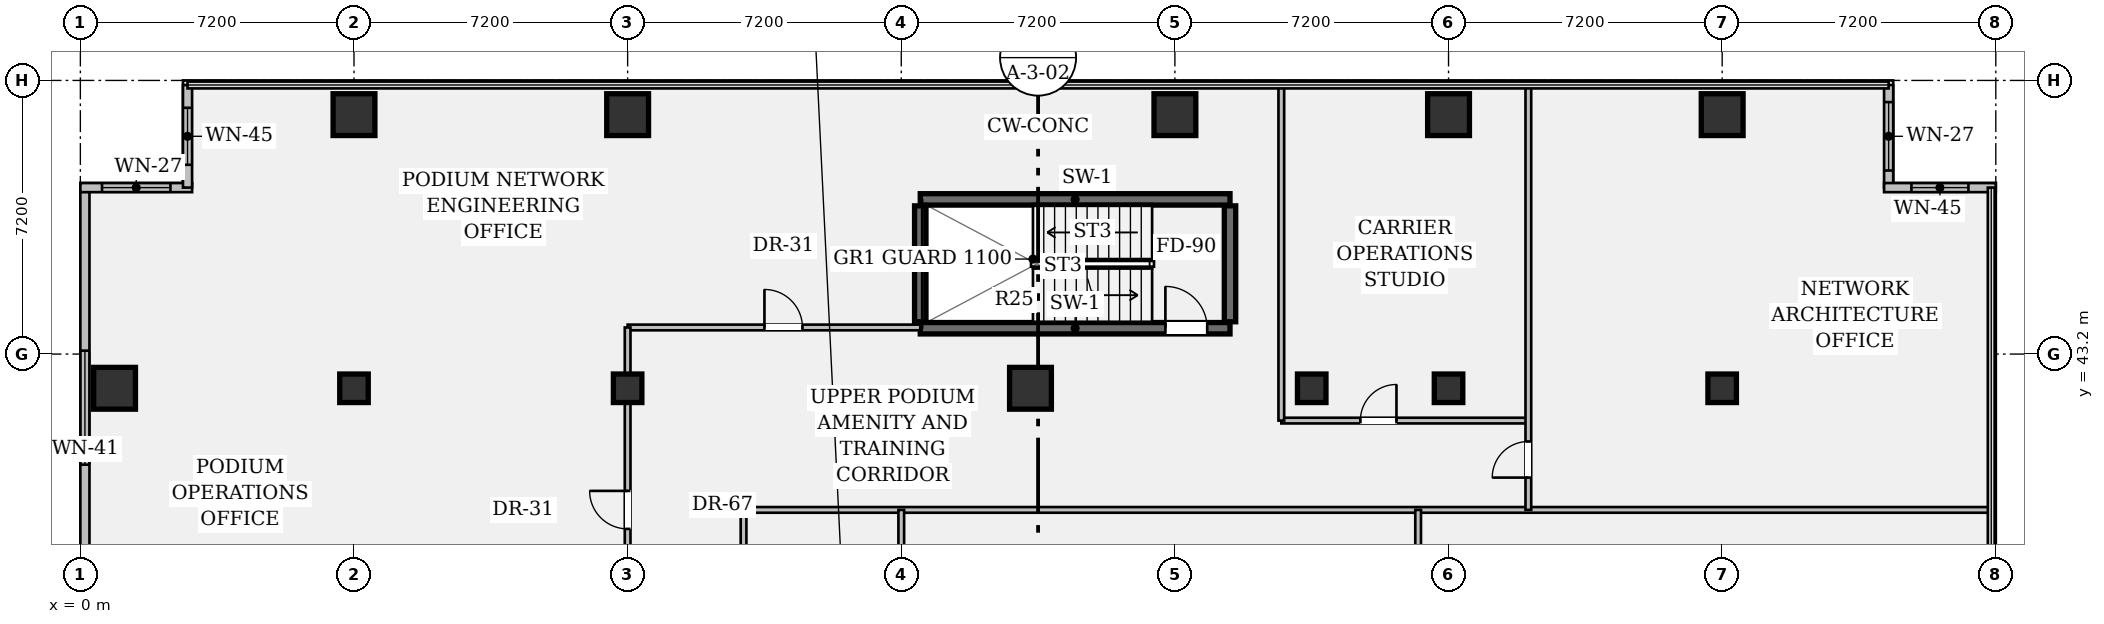
"""IFC4 building model, lengths in metres.
Left out: names, types, materials, properties, quantities, classifications, styles, units other than length and angle.
Written with IfcOpenShell. Run it as: python <this file> out.ifc"""

import sys

from ifc_helpers import new_model, si_unit, direction, frame, frame_2d, origin, origin_2d, place, context, subcontext, project, spatial, rectangle, hollow_rectangle, extrude, element, fill, save


model = new_model("IFC4")
c1 = context("Model", 3, precision=1e-05, world=origin(), true_north=direction((0.0, 1.0)))
c2 = subcontext(c1, "Body", "Model", "MODEL_VIEW")
j1 = project(units=[si_unit("LENGTHUNIT", "METRE"), si_unit("PLANEANGLEUNIT", "RADIAN")], contexts=[c1])
p1 = place(None, origin())
s1 = spatial("IfcSite", under=j1, at=p1, CompositionType="ELEMENT")
p2 = place(p1, origin())
s2 = spatial("IfcBuilding", under=s1, at=p2, CompositionType="ELEMENT")
p3 = place(p2, frame((0.0, 0.0, 17.85)))
s3 = spatial("IfcBuildingStorey", under=s2, at=p3, CompositionType="ELEMENT", Elevation=17.85)
p4 = place(p3, frame((22.1, 43.88, 0.0), z_axis=(0.0, 0.0, 1.0), x_axis=(1.0, 0.0, 0.0)))
e1 = element("IfcWall", 1, at=p4, inside=s3, PredefinedType="SHEAR", context=c2, shape_type="SweptSolid", body=[
    extrude(rectangle(XDim=8.15, YDim=0.3, at=frame_2d((4.075, 0.0))), origin(), (0.0, 0.0, 1.0), 3.91),
])
p5 = place(p4, frame((6.45, 0.0, 0.0)))
e2 = element("IfcOpeningElement", 2, at=p5, cuts=e1, PredefinedType="OPENING", context=c2, shape_type="SweptSolid", body=[
    extrude(rectangle(XDim=1.1, YDim=2.15, at=frame_2d((0.55, 1.075))), frame((0.0, 0.162, 0.0), z_axis=(0.0, -1.0, 0.0), x_axis=(1.0, 0.0, 0.0)), (0.0, 0.0, 1.0), 0.324),
])
p6 = place(p3, frame((22.1, 47.27, 0.0), z_axis=(0.0, 0.0, 1.0), x_axis=(1.0, 0.0, 0.0)))
e3 = element("IfcWall", 3, at=p6, inside=s3, PredefinedType="SHEAR", context=c2, shape_type="SweptSolid", body=[
    extrude(rectangle(XDim=8.15, YDim=0.3, at=frame_2d((4.075, 0.0))), origin(), (0.0, 0.0, 1.0), 3.91),
])
for number, where, z_axis, x_axis in (
    (4, (22.1, 44.05, 0.0), (0.0, 0.0, 1.0), (0.0, 1.0, 0.0)),
    (5, (30.25, 44.05, 0.0), (0.0, 0.0, 1.0), (0.0, 1.0, 0.0)),
):
    element("IfcWall", number, at=place(p3, frame(where, z_axis=z_axis, x_axis=x_axis)), inside=s3, PredefinedType="SHEAR", context=c2, shape_type="SweptSolid", body=[
        extrude(rectangle(XDim=3.05, YDim=0.3, at=frame_2d((1.525, 0.0))), origin(), (0.0, 0.0, 1.0), 3.91),
    ])
p7 = place(p3, frame((0.9, 42.3, 0.0), z_axis=(0.0, 0.0, 1.0), x_axis=(1.0, 0.0, 0.0)))
e6 = element("IfcColumn", 6, at=p7, inside=s3, PredefinedType="COLUMN", context=c2, shape_type="SweptSolid", body=[
    extrude(hollow_rectangle(XDim=1.1, YDim=1.1, WallThickness=0.07, at=origin_2d()), origin(), (0.0, 0.0, 1.0), 3.91),
])
p8 = place(p3, frame((7.2, 42.3, 0.0), z_axis=(0.0, 0.0, 1.0), x_axis=(1.0, 0.0, 0.0)))
e7 = element("IfcColumn", 7, at=p8, inside=s3, PredefinedType="COLUMN", context=c2, shape_type="SweptSolid", body=[
    extrude(rectangle(XDim=0.75, YDim=0.75, at=origin_2d()), origin(), (0.0, 0.0, 1.0), 3.91),
])
p9 = place(p3, frame((7.2, 49.5, 0.0), z_axis=(0.0, 0.0, 1.0), x_axis=(1.0, 0.0, 0.0)))
e8 = element("IfcColumn", 8, at=p9, inside=s3, PredefinedType="COLUMN", context=c2, shape_type="SweptSolid", body=[
    extrude(hollow_rectangle(XDim=1.1, YDim=1.1, WallThickness=0.07, at=origin_2d()), origin(), (0.0, 0.0, 1.0), 3.91),
])
p10 = place(p3, frame((14.4, 42.3, 0.0), z_axis=(0.0, 0.0, 1.0), x_axis=(1.0, 0.0, 0.0)))
e9 = element("IfcColumn", 9, at=p10, inside=s3, PredefinedType="COLUMN", context=c2, shape_type="SweptSolid", body=[
    extrude(rectangle(XDim=0.75, YDim=0.75, at=origin_2d()), origin(), (0.0, 0.0, 1.0), 3.91),
])
for number, where, z_axis, x_axis in (
    (10, (14.4, 49.5, 0.0), (0.0, 0.0, 1.0), (1.0, 0.0, 0.0)),
    (11, (25.0, 42.3, 0.0), (0.0, 0.0, 1.0), (1.0, 0.0, 0.0)),
    (12, (28.8, 49.5, 0.0), (0.0, 0.0, 1.0), (1.0, 0.0, 0.0)),
):
    element("IfcColumn", number, at=place(p3, frame(where, z_axis=z_axis, x_axis=x_axis)), inside=s3, PredefinedType="COLUMN", context=c2, shape_type="SweptSolid", body=[
        extrude(hollow_rectangle(XDim=1.1, YDim=1.1, WallThickness=0.07, at=origin_2d()), origin(), (0.0, 0.0, 1.0), 3.91),
    ])
for number, where, z_axis, x_axis in (
    (13, (32.4, 42.3, 0.0), (0.0, 0.0, 1.0), (1.0, 0.0, 0.0)),
    (14, (36.0, 42.3, 0.0), (0.0, 0.0, 1.0), (1.0, 0.0, 0.0)),
):
    element("IfcColumn", number, at=place(p3, frame(where, z_axis=z_axis, x_axis=x_axis)), inside=s3, PredefinedType="COLUMN", context=c2, shape_type="SweptSolid", body=[
        extrude(rectangle(XDim=0.75, YDim=0.75, at=origin_2d()), origin(), (0.0, 0.0, 1.0), 3.91),
    ])
p11 = place(p3, frame((36.0, 49.5, 0.0), z_axis=(0.0, 0.0, 1.0), x_axis=(1.0, 0.0, 0.0)))
e15 = element("IfcColumn", 15, at=p11, inside=s3, PredefinedType="COLUMN", context=c2, shape_type="SweptSolid", body=[
    extrude(hollow_rectangle(XDim=1.1, YDim=1.1, WallThickness=0.07, at=origin_2d()), origin(), (0.0, 0.0, 1.0), 3.91),
])
p12 = place(p3, frame((43.2, 42.3, 0.0), z_axis=(0.0, 0.0, 1.0), x_axis=(1.0, 0.0, 0.0)))
e16 = element("IfcColumn", 16, at=p12, inside=s3, PredefinedType="COLUMN", context=c2, shape_type="SweptSolid", body=[
    extrude(rectangle(XDim=0.75, YDim=0.75, at=origin_2d()), origin(), (0.0, 0.0, 1.0), 3.91),
])
p13 = place(p3, frame((43.2, 49.5, 0.0), z_axis=(0.0, 0.0, 1.0), x_axis=(1.0, 0.0, 0.0)))
e17 = element("IfcColumn", 17, at=p13, inside=s3, PredefinedType="COLUMN", context=c2, shape_type="SweptSolid", body=[
    extrude(hollow_rectangle(XDim=1.1, YDim=1.1, WallThickness=0.07, at=origin_2d()), origin(), (0.0, 0.0, 1.0), 3.91),
])
p14 = place(p3, frame((0.12, 36.0, 0.0), z_axis=(0.0, 0.0, 1.0), x_axis=(0.0, 1.0, 0.0)))
e18 = element("IfcWall", 18, at=p14, inside=s3, PredefinedType="STANDARD", context=c2, shape_type="SweptSolid", body=[
    extrude(rectangle(XDim=11.58, YDim=0.24, at=frame_2d((5.79, 0.0))), origin(), (0.0, 0.0, 1.0), 3.91),
])
p15 = place(p14, frame((4.29, 0.0, 0.95)))
e19 = element("IfcOpeningElement", 19, at=p15, cuts=e18, PredefinedType="OPENING", context=c2, shape_type="SweptSolid", body=[
    extrude(rectangle(XDim=3.0, YDim=1.5, at=frame_2d((1.5, 0.75))), frame((0.0, 0.132, 0.0), z_axis=(0.0, -1.0, 0.0), x_axis=(1.0, 0.0, 0.0)), (0.0, 0.0, 1.0), 0.264),
])
p16 = place(p3, frame((0.0, 47.58, 0.0), z_axis=(0.0, 0.0, 1.0), x_axis=(1.0, 0.0, 0.0)))
e20 = element("IfcWall", 20, at=p16, inside=s3, PredefinedType="STANDARD", context=c2, shape_type="SweptSolid", body=[
    extrude(rectangle(XDim=2.94, YDim=0.24, at=frame_2d((1.47, 0.0))), origin(), (0.0, 0.0, 1.0), 3.91),
])
p17 = place(p16, frame((0.57, 0.0, 0.95)))
e21 = element("IfcOpeningElement", 21, at=p17, cuts=e20, PredefinedType="OPENING", context=c2, shape_type="SweptSolid", body=[
    extrude(rectangle(XDim=1.8, YDim=1.35, at=frame_2d((0.9, 0.675))), frame((0.0, 0.132, 0.0), z_axis=(0.0, -1.0, 0.0), x_axis=(1.0, 0.0, 0.0)), (0.0, 0.0, 1.0), 0.264),
])
p18 = place(p3, frame((2.82, 47.58, 0.0), z_axis=(0.0, 0.0, 1.0), x_axis=(0.0, 1.0, 0.0)))
e22 = element("IfcWall", 22, at=p18, inside=s3, PredefinedType="STANDARD", context=c2, shape_type="SweptSolid", body=[
    extrude(rectangle(XDim=2.7, YDim=0.24, at=frame_2d((1.35, 0.0))), origin(), (0.0, 0.0, 1.0), 3.91),
])
p19 = place(p18, frame((0.6, 0.0, 0.95)))
e23 = element("IfcOpeningElement", 23, at=p19, cuts=e22, PredefinedType="OPENING", context=c2, shape_type="SweptSolid", body=[
    extrude(rectangle(XDim=1.5, YDim=1.8, at=frame_2d((0.75, 0.9))), frame((0.0, 0.132, 0.0), z_axis=(0.0, -1.0, 0.0), x_axis=(1.0, 0.0, 0.0)), (0.0, 0.0, 1.0), 0.264),
])
p20 = place(p3, frame((47.58, 50.28, 0.0), z_axis=(0.0, 0.0, 1.0), x_axis=(0.0, -1.0, 0.0)))
e24 = element("IfcWall", 24, at=p20, inside=s3, PredefinedType="STANDARD", context=c2, shape_type="SweptSolid", body=[
    extrude(rectangle(XDim=2.7, YDim=0.24, at=frame_2d((1.35, 0.0))), origin(), (0.0, 0.0, 1.0), 3.91),
])
p21 = place(p20, frame((0.45, 0.0, 0.95)))
e25 = element("IfcOpeningElement", 25, at=p21, cuts=e24, PredefinedType="OPENING", context=c2, shape_type="SweptSolid", body=[
    extrude(rectangle(XDim=1.8, YDim=1.35, at=frame_2d((0.9, 0.675))), frame((0.0, 0.132, 0.0), z_axis=(0.0, -1.0, 0.0), x_axis=(1.0, 0.0, 0.0)), (0.0, 0.0, 1.0), 0.264),
])
p22 = place(p3, frame((47.46, 47.58, 0.0), z_axis=(0.0, 0.0, 1.0), x_axis=(1.0, 0.0, 0.0)))
e26 = element("IfcWall", 26, at=p22, inside=s3, PredefinedType="STANDARD", context=c2, shape_type="SweptSolid", body=[
    extrude(rectangle(XDim=2.94, YDim=0.24, at=frame_2d((1.47, 0.0))), origin(), (0.0, 0.0, 1.0), 3.91),
])
p23 = place(p22, frame((0.72, 0.0, 0.95)))
e27 = element("IfcOpeningElement", 27, at=p23, cuts=e26, PredefinedType="OPENING", context=c2, shape_type="SweptSolid", body=[
    extrude(rectangle(XDim=1.5, YDim=1.8, at=frame_2d((0.75, 0.9))), frame((0.0, 0.132, 0.0), z_axis=(0.0, -1.0, 0.0), x_axis=(1.0, 0.0, 0.0)), (0.0, 0.0, 1.0), 0.264),
])
p24 = place(p3, frame((17.45, 26.8, 0.0), z_axis=(0.0, 0.0, 1.0), x_axis=(0.0, 1.0, 0.0)))
e28 = element("IfcWall", 28, at=p24, inside=s3, PredefinedType="PARTITIONING", context=c2, shape_type="SweptSolid", body=[
    extrude(rectangle(XDim=12.3, YDim=0.15, at=frame_2d((6.15, 0.0))), origin(), (0.0, 0.0, 1.0), 2.968),
])
p25 = place(p24, frame((9.76, 0.0, 0.0)))
e29 = element("IfcOpeningElement", 29, at=p25, cuts=e28, PredefinedType="OPENING", context=c2, shape_type="SweptSolid", body=[
    extrude(rectangle(XDim=0.95, YDim=2.15, at=frame_2d((0.475, 1.075))), frame((0.0, 0.087, 0.0), z_axis=(0.0, -1.0, 0.0), x_axis=(1.0, 0.0, 0.0)), (0.0, 0.0, 1.0), 0.174),
])
p26 = place(p24, frame((6.76, 0.0, 0.0)))
e30 = element("IfcOpeningElement", 30, at=p26, cuts=e28, PredefinedType="OPENING", context=c2, shape_type="SweptSolid", body=[
    extrude(rectangle(XDim=0.95, YDim=2.15, at=frame_2d((0.475, 1.075))), frame((0.0, 0.087, 0.0), z_axis=(0.0, -1.0, 0.0), x_axis=(1.0, 0.0, 0.0)), (0.0, 0.0, 1.0), 0.174),
])
p27 = place(p24, frame((3.76, 0.0, 0.0)))
e31 = element("IfcOpeningElement", 31, at=p27, cuts=e28, PredefinedType="OPENING", context=c2, shape_type="SweptSolid", body=[
    extrude(rectangle(XDim=0.95, YDim=2.15, at=frame_2d((0.475, 1.075))), frame((0.0, 0.087, 0.0), z_axis=(0.0, -1.0, 0.0), x_axis=(1.0, 0.0, 0.0)), (0.0, 0.0, 1.0), 0.174),
])
p28 = place(p24, frame((0.65, 0.0, 0.0)))
e32 = element("IfcOpeningElement", 32, at=p28, cuts=e28, PredefinedType="OPENING", context=c2, shape_type="SweptSolid", body=[
    extrude(rectangle(XDim=0.95, YDim=2.15, at=frame_2d((0.475, 1.075))), frame((0.0, 0.087, 0.0), z_axis=(0.0, -1.0, 0.0), x_axis=(1.0, 0.0, 0.0)), (0.0, 0.0, 1.0), 0.174),
])
p29 = place(p3, frame((14.4, 43.9, 0.0), z_axis=(0.0, 0.0, 1.0), x_axis=(1.0, 0.0, 0.0)))
e33 = element("IfcWall", 33, at=p29, inside=s3, PredefinedType="PARTITIONING", context=c2, shape_type="SweptSolid", body=[
    extrude(rectangle(XDim=7.7, YDim=0.15, at=frame_2d((3.85, 0.0))), origin(), (0.0, 0.0, 1.0), 2.968),
])
p30 = place(p29, frame((3.6, 0.0, 0.0)))
e34 = element("IfcOpeningElement", 34, at=p30, cuts=e33, PredefinedType="OPENING", context=c2, shape_type="SweptSolid", body=[
    extrude(rectangle(XDim=1.0, YDim=2.15, at=frame_2d((0.5, 1.075))), frame((0.0, 0.087, 0.0), z_axis=(0.0, -1.0, 0.0), x_axis=(1.0, 0.0, 0.0)), (0.0, 0.0, 1.0), 0.174),
])
p31 = place(p3, frame((31.6, 41.45, 0.0), z_axis=(0.0, 0.0, 1.0), x_axis=(1.0, 0.0, 0.0)))
e35 = element("IfcWall", 35, at=p31, inside=s3, PredefinedType="PARTITIONING", context=c2, shape_type="SweptSolid", body=[
    extrude(rectangle(XDim=6.5, YDim=0.15, at=frame_2d((3.25, 0.0))), origin(), (0.0, 0.0, 1.0), 2.968),
])
p32 = place(p31, frame((2.08, 0.0, 0.0)))
e36 = element("IfcOpeningElement", 36, at=p32, cuts=e35, PredefinedType="OPENING", context=c2, shape_type="SweptSolid", body=[
    extrude(rectangle(XDim=0.95, YDim=2.15, at=frame_2d((0.475, 1.075))), frame((0.0, 0.087, 0.0), z_axis=(0.0, -1.0, 0.0), x_axis=(1.0, 0.0, 0.0)), (0.0, 0.0, 1.0), 0.174),
])
p33 = place(p3, frame((17.45, 39.1, 0.0), z_axis=(0.0, 0.0, 1.0), x_axis=(1.0, 0.0, 0.0)))
e37 = element("IfcWall", 37, at=p33, inside=s3, PredefinedType="PARTITIONING", context=c2, shape_type="SweptSolid", body=[
    extrude(rectangle(XDim=32.83, YDim=0.15, at=frame_2d((16.415, 0.0))), origin(), (0.0, 0.0, 1.0), 2.968),
])
p34 = place(p3, frame((31.6, 41.45, 0.0), z_axis=(0.0, 0.0, 1.0), x_axis=(0.0, 1.0, 0.0)))
e38 = element("IfcWall", 38, at=p34, inside=s3, PredefinedType="PARTITIONING", context=c2, shape_type="SweptSolid", body=[
    extrude(rectangle(XDim=8.83, YDim=0.15, at=frame_2d((4.415, 0.0))), origin(), (0.0, 0.0, 1.0), 2.968),
])
p35 = place(p3, frame((38.1, 39.1, 0.0), z_axis=(0.0, 0.0, 1.0), x_axis=(0.0, 1.0, 0.0)))
e39 = element("IfcWall", 39, at=p35, inside=s3, PredefinedType="PARTITIONING", context=c2, shape_type="SweptSolid", body=[
    extrude(rectangle(XDim=11.18, YDim=0.15, at=frame_2d((5.59, 0.0))), origin(), (0.0, 0.0, 1.0), 2.968),
])
p36 = place(p35, frame((0.85, 0.0, 0.0)))
e40 = element("IfcOpeningElement", 40, at=p36, cuts=e39, PredefinedType="OPENING", context=c2, shape_type="SweptSolid", body=[
    extrude(rectangle(XDim=0.95, YDim=2.15, at=frame_2d((0.475, 1.075))), frame((0.0, 0.087, 0.0), z_axis=(0.0, -1.0, 0.0), x_axis=(1.0, 0.0, 0.0)), (0.0, 0.0, 1.0), 0.174),
])
for number, where, z_axis, x_axis in (
    (41, (21.6, 26.8, 0.0), (0.0, 0.0, 1.0), (0.0, 1.0, 0.0)),
    (42, (35.2, 26.8, 0.0), (0.0, 0.0, 1.0), (0.0, 1.0, 0.0)),
):
    element("IfcWall", number, at=place(p3, frame(where, z_axis=z_axis, x_axis=x_axis)), inside=s3, PredefinedType="PARTITIONING", context=c2, shape_type="SweptSolid", body=[
        extrude(rectangle(XDim=12.3, YDim=0.15, at=frame_2d((6.15, 0.0))), origin(), (0.0, 0.0, 1.0), 2.968),
    ])
p37 = place(p3, frame((14.4, 36.0, 0.0), z_axis=(0.0, 0.0, 1.0), x_axis=(0.0, 1.0, 0.0)))
e43 = element("IfcWall", 43, at=p37, inside=s3, PredefinedType="PARTITIONING", context=c2, shape_type="SweptSolid", body=[
    extrude(rectangle(XDim=7.9, YDim=0.15, at=frame_2d((3.95, 0.0))), origin(), (0.0, 0.0, 1.0), 2.968),
])
p38 = place(p37, frame((2.6, 0.0, 0.0)))
e44 = element("IfcOpeningElement", 44, at=p38, cuts=e43, PredefinedType="OPENING", context=c2, shape_type="SweptSolid", body=[
    extrude(rectangle(XDim=1.0, YDim=2.15, at=frame_2d((0.5, 1.075))), frame((0.0, 0.087, 0.0), z_axis=(0.0, -1.0, 0.0), x_axis=(1.0, 0.0, 0.0)), (0.0, 0.0, 1.0), 0.174),
])
p39 = place(p15, origin())
e45 = element("IfcWindow", 45, at=p39, inside=s3, PartitioningType="SINGLE_PANEL", PredefinedType="WINDOW", context=c2, shape_type="SweptSolid", body=[
    extrude(rectangle(XDim=3.0, YDim=1.5, at=frame_2d((1.5, 0.75))), frame((0.0, 0.03, 0.0), z_axis=(0.0, -1.0, 0.0), x_axis=(1.0, 0.0, 0.0)), (0.0, 0.0, 1.0), 0.06),
])
fill(e19, e45)
p40 = place(p17, origin())
e46 = element("IfcWindow", 46, at=p40, inside=s3, PartitioningType="SINGLE_PANEL", PredefinedType="WINDOW", context=c2, shape_type="SweptSolid", body=[
    extrude(rectangle(XDim=1.8, YDim=1.35, at=frame_2d((0.9, 0.675))), frame((0.0, 0.03, 0.0), z_axis=(0.0, -1.0, 0.0), x_axis=(1.0, 0.0, 0.0)), (0.0, 0.0, 1.0), 0.06),
])
fill(e21, e46)
p41 = place(p19, origin())
e47 = element("IfcWindow", 47, at=p41, inside=s3, PartitioningType="SINGLE_PANEL", PredefinedType="WINDOW", context=c2, shape_type="SweptSolid", body=[
    extrude(rectangle(XDim=1.5, YDim=1.8, at=frame_2d((0.75, 0.9))), frame((0.0, 0.03, 0.0), z_axis=(0.0, -1.0, 0.0), x_axis=(1.0, 0.0, 0.0)), (0.0, 0.0, 1.0), 0.06),
])
fill(e23, e47)
p42 = place(p21, origin())
e48 = element("IfcWindow", 48, at=p42, inside=s3, PartitioningType="SINGLE_PANEL", PredefinedType="WINDOW", context=c2, shape_type="SweptSolid", body=[
    extrude(rectangle(XDim=1.8, YDim=1.35, at=frame_2d((0.9, 0.675))), frame((0.0, 0.03, 0.0), z_axis=(0.0, -1.0, 0.0), x_axis=(1.0, 0.0, 0.0)), (0.0, 0.0, 1.0), 0.06),
])
fill(e25, e48)
p43 = place(p23, origin())
e49 = element("IfcWindow", 49, at=p43, inside=s3, PartitioningType="SINGLE_PANEL", PredefinedType="WINDOW", context=c2, shape_type="SweptSolid", body=[
    extrude(rectangle(XDim=1.5, YDim=1.8, at=frame_2d((0.75, 0.9))), frame((0.0, 0.03, 0.0), z_axis=(0.0, -1.0, 0.0), x_axis=(1.0, 0.0, 0.0)), (0.0, 0.0, 1.0), 0.06),
])
fill(e27, e49)
p44 = place(p5, origin())
e50 = element("IfcDoor", 50, at=p44, inside=s3, OperationType="SINGLE_SWING_LEFT", PredefinedType="DOOR", context=c2, shape_type="SweptSolid", body=[
    extrude(rectangle(XDim=1.1, YDim=2.15, at=frame_2d((0.55, 1.075))), frame((0.0, 0.025, 0.0), z_axis=(0.0, -1.0, 0.0), x_axis=(1.0, 0.0, 0.0)), (0.0, 0.0, 1.0), 0.05),
])
fill(e2, e50)
p45 = place(p32, origin())
e51 = element("IfcDoor", 51, at=p45, inside=s3, OperationType="SINGLE_SWING_RIGHT", PredefinedType="DOOR", context=c2, shape_type="SweptSolid", body=[
    extrude(rectangle(XDim=0.95, YDim=2.15, at=frame_2d((0.475, 1.075))), frame((0.0, 0.025, 0.0), z_axis=(0.0, -1.0, 0.0), x_axis=(1.0, 0.0, 0.0)), (0.0, 0.0, 1.0), 0.05),
])
fill(e36, e51)
p46 = place(p36, origin())
e52 = element("IfcDoor", 52, at=p46, inside=s3, OperationType="SINGLE_SWING_LEFT", PredefinedType="DOOR", context=c2, shape_type="SweptSolid", body=[
    extrude(rectangle(XDim=0.95, YDim=2.15, at=frame_2d((0.475, 1.075))), frame((0.0, 0.025, 0.0), z_axis=(0.0, -1.0, 0.0), x_axis=(1.0, 0.0, 0.0)), (0.0, 0.0, 1.0), 0.05),
])
fill(e40, e52)
p47 = place(p30, origin())
e53 = element("IfcDoor", 53, at=p47, inside=s3, OperationType="SINGLE_SWING_LEFT", PredefinedType="DOOR", context=c2, shape_type="SweptSolid", body=[
    extrude(rectangle(XDim=1.0, YDim=2.15, at=frame_2d((0.5, 1.075))), frame((0.0, 0.025, 0.0), z_axis=(0.0, -1.0, 0.0), x_axis=(1.0, 0.0, 0.0)), (0.0, 0.0, 1.0), 0.05),
])
fill(e34, e53)
p48 = place(p38, origin())
e54 = element("IfcDoor", 54, at=p48, inside=s3, OperationType="SINGLE_SWING_RIGHT", PredefinedType="DOOR", context=c2, shape_type="SweptSolid", body=[
    extrude(rectangle(XDim=1.0, YDim=2.15, at=frame_2d((0.5, 1.075))), frame((0.0, 0.025, 0.0), z_axis=(0.0, -1.0, 0.0), x_axis=(1.0, 0.0, 0.0)), (0.0, 0.0, 1.0), 0.05),
])
fill(e44, e54)
save(model, sys.argv[1])
